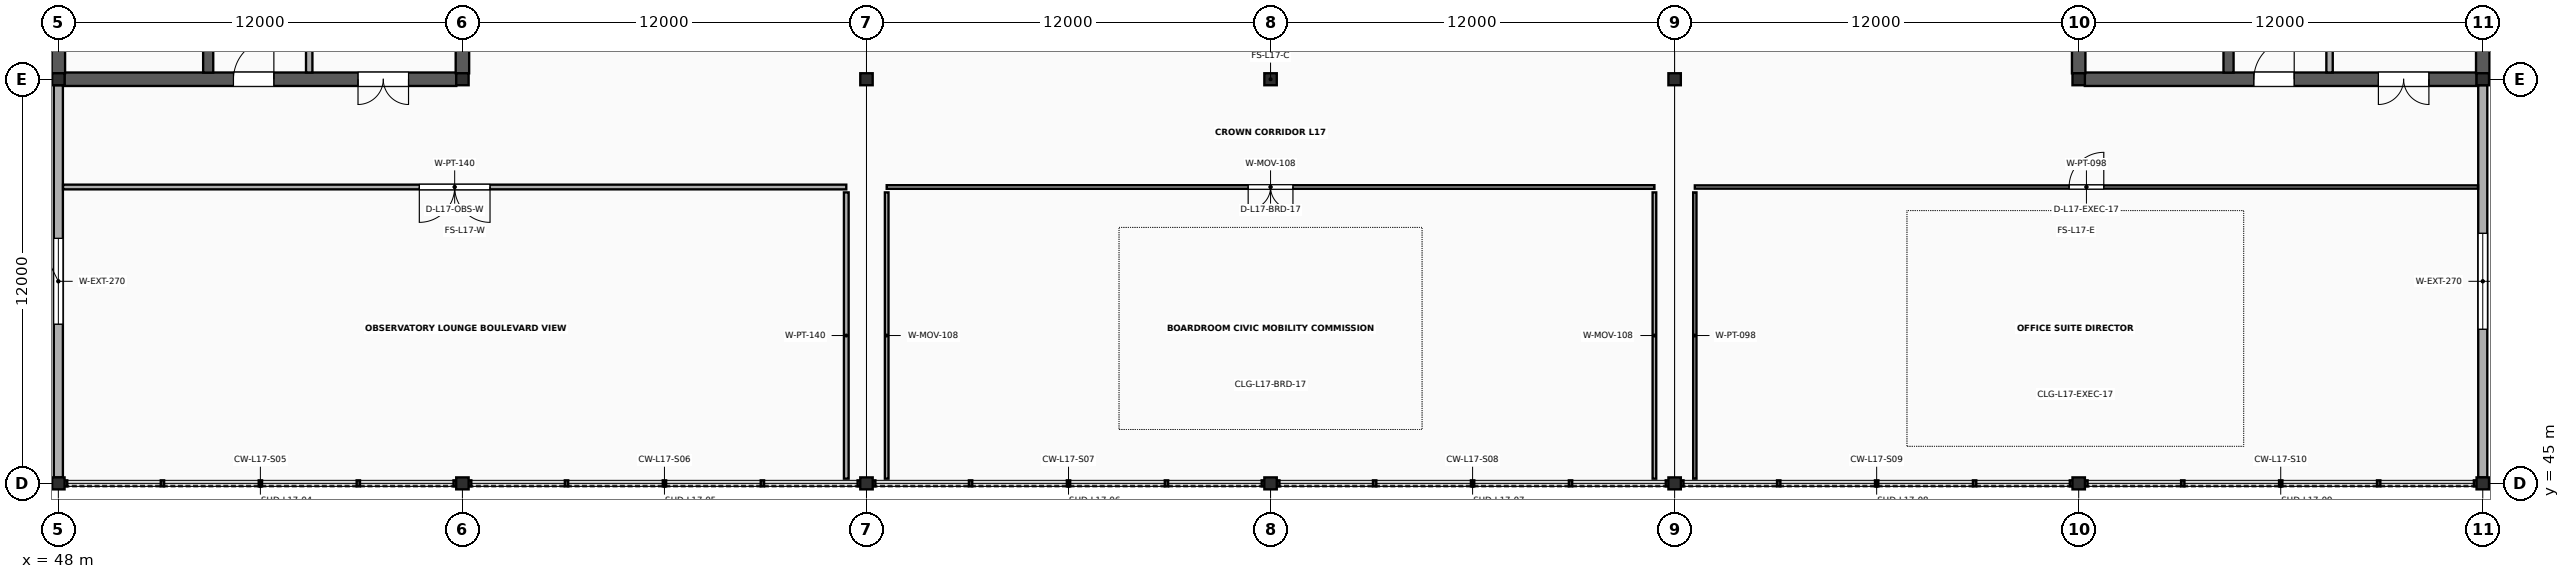
"""IFC4 building model, lengths in metres.
Left out: names, types, materials, properties, quantities, classifications, styles, units other than length and angle.
Written with IfcOpenShell. Run it as: python <this file> out.ifc"""

import sys

from ifc_helpers import new_model, si_unit, direction, frame, frame_2d, origin, origin_2d, place, context, subcontext, project, spatial, rectangle, i_section, extrude, element, fill, save


model = new_model("IFC4")
c1 = context("Model", 3, precision=1e-05, world=origin(), true_north=direction((0.0, 1.0)))
c2 = subcontext(c1, "Body", "Model", "MODEL_VIEW")
j1 = project(units=[si_unit("LENGTHUNIT", "METRE"), si_unit("PLANEANGLEUNIT", "RADIAN")], contexts=[c1])
p1 = place(None, origin())
s1 = spatial("IfcSite", under=j1, at=p1, CompositionType="ELEMENT")
p2 = place(p1, origin())
s2 = spatial("IfcBuilding", under=s1, at=p2, CompositionType="ELEMENT")
p3 = place(p2, frame((0.0, 0.0, 69.6)))
s3 = spatial("IfcBuildingStorey", under=s2, at=p3, CompositionType="ELEMENT", Elevation=69.6)
for number, where, z_axis, x_axis in (
    (1, (48.0, 45.0, 0.0), (0.0, 0.0, 1.0), (1.0, 0.0, 0.0)),
    (2, (48.0, 57.0, 0.0), (0.0, 0.0, 1.0), (1.0, 0.0, 0.0)),
    (3, (60.0, 45.0, 0.0), (0.0, 0.0, 1.0), (1.0, 0.0, 0.0)),
    (4, (60.0, 57.0, 0.0), (0.0, 0.0, 1.0), (1.0, 0.0, 0.0)),
    (5, (72.0, 45.0, 0.0), (0.0, 0.0, 1.0), (1.0, 0.0, 0.0)),
    (6, (72.0, 57.0, 0.0), (0.0, 0.0, 1.0), (1.0, 0.0, 0.0)),
    (7, (84.0, 45.0, 0.0), (0.0, 0.0, 1.0), (1.0, 0.0, 0.0)),
    (8, (84.0, 57.0, 0.0), (0.0, 0.0, 1.0), (1.0, 0.0, 0.0)),
    (9, (96.0, 45.0, 0.0), (0.0, 0.0, 1.0), (1.0, 0.0, 0.0)),
    (10, (96.0, 57.0, 0.0), (0.0, 0.0, 1.0), (1.0, 0.0, 0.0)),
    (11, (108.0, 45.0, 0.0), (0.0, 0.0, 1.0), (1.0, 0.0, 0.0)),
    (12, (108.0, 57.0, 0.0), (0.0, 0.0, 1.0), (1.0, 0.0, 0.0)),
    (13, (120.0, 45.0, 0.0), (0.0, 0.0, 1.0), (1.0, 0.0, 0.0)),
    (14, (120.0, 57.0, 0.0), (0.0, 0.0, 1.0), (1.0, 0.0, 0.0)),
):
    element("IfcColumn", number, at=place(p3, frame(where, z_axis=z_axis, x_axis=x_axis)), inside=s3, PredefinedType="COLUMN", context=c2, shape_type="SweptSolid", body=[
        extrude(i_section(OverallWidth=0.369, OverallDepth=0.356, WebThickness=0.011, FlangeThickness=0.018, FilletRadius=0.018, at=origin_2d()), origin(), (0.0, 0.0, 1.0), 4.6),
    ])
p4 = place(p3, frame((48.181, 57.0, 0.0), z_axis=(0.0, 0.0, 1.0), x_axis=(1.0, 0.0, 0.0)))
e15 = element("IfcWall", 15, at=p4, inside=s3, PredefinedType="SHEAR", context=c2, shape_type="SweptSolid", body=[
    extrude(rectangle(XDim=11.637, YDim=0.4, at=frame_2d((5.819, 0.0))), origin(), (0.0, 0.0, 1.0), 4.383),
])
p5 = place(p4, frame((5.019, 0.0, 0.0)))
e16 = element("IfcOpeningElement", 16, at=p5, cuts=e15, PredefinedType="OPENING", context=c2, shape_type="SweptSolid", body=[
    extrude(rectangle(XDim=1.2, YDim=2.2, at=frame_2d((0.6, 1.1))), frame((0.0, 0.215, 0.0), z_axis=(0.0, -1.0, 0.0), x_axis=(1.0, 0.0, 0.0)), (0.0, 0.0, 1.0), 0.43),
])
p6 = place(p4, frame((8.718, 0.0, 0.0)))
e17 = element("IfcOpeningElement", 17, at=p6, cuts=e15, PredefinedType="OPENING", context=c2, shape_type="SweptSolid", body=[
    extrude(rectangle(XDim=1.5, YDim=2.25, at=frame_2d((0.75, 1.125))), frame((0.0, 0.215, 0.0), z_axis=(0.0, -1.0, 0.0), x_axis=(1.0, 0.0, 0.0)), (0.0, 0.0, 1.0), 0.43),
])
for number, where, z_axis, x_axis in (
    (18, (48.0, 57.175, 0.0), (0.0, 0.0, 1.0), (0.0, 1.0, 0.0)),
    (19, (60.0, 57.175, 0.0), (0.0, 0.0, 1.0), (0.0, 1.0, 0.0)),
):
    element("IfcWall", number, at=place(p3, frame(where, z_axis=z_axis, x_axis=x_axis)), inside=s3, PredefinedType="SHEAR", context=c2, shape_type="SweptSolid", body=[
        extrude(rectangle(XDim=11.65, YDim=0.4, at=frame_2d((5.825, 0.0))), origin(), (0.0, 0.0, 1.0), 4.383),
    ])
p7 = place(p3, frame((52.45, 57.197, 0.0), z_axis=(0.0, 0.0, 1.0), x_axis=(0.0, 1.0, 0.0)))
e20 = element("IfcWall", 20, at=p7, inside=s3, PredefinedType="SHEAR", context=c2, shape_type="SweptSolid", body=[
    extrude(rectangle(XDim=11.606, YDim=0.3, at=frame_2d((5.803, 0.0))), origin(), (0.0, 0.0, 1.0), 4.383),
])
p8 = place(p7, frame((0.9, 0.0, 0.0)))
e21 = element("IfcOpeningElement", 21, at=p8, cuts=e20, PredefinedType="OPENING", context=c2, shape_type="SweptSolid", body=[
    extrude(rectangle(XDim=1.1, YDim=2.2, at=frame_2d((0.55, 1.1))), frame((0.0, 0.165, 0.0), z_axis=(0.0, -1.0, 0.0), x_axis=(1.0, 0.0, 0.0)), (0.0, 0.0, 1.0), 0.33),
])
p9 = place(p3, frame((55.45, 57.2, 0.0), z_axis=(0.0, 0.0, 1.0), x_axis=(0.0, 1.0, 0.0)))
e22 = element("IfcWall", 22, at=p9, inside=s3, PredefinedType="SOLIDWALL", context=c2, shape_type="SweptSolid", body=[
    extrude(rectangle(XDim=8.48, YDim=0.19, at=frame_2d((4.24, 0.0))), origin(), (0.0, 0.0, 1.0), 4.373),
])
p10 = place(p9, frame((3.6, 0.0, 0.0)))
e23 = element("IfcOpeningElement", 23, at=p10, cuts=e22, PredefinedType="OPENING", context=c2, shape_type="SweptSolid", body=[
    extrude(rectangle(XDim=1.04, YDim=2.18, at=frame_2d((0.52, 1.09))), frame((0.0, 0.11, 0.0), z_axis=(0.0, -1.0, 0.0), x_axis=(1.0, 0.0, 0.0)), (0.0, 0.0, 1.0), 0.22),
])
p11 = place(p3, frame((108.181, 57.0, 0.0), z_axis=(0.0, 0.0, 1.0), x_axis=(1.0, 0.0, 0.0)))
e24 = element("IfcWall", 24, at=p11, inside=s3, PredefinedType="SHEAR", context=c2, shape_type="SweptSolid", body=[
    extrude(rectangle(XDim=11.637, YDim=0.4, at=frame_2d((5.819, 0.0))), origin(), (0.0, 0.0, 1.0), 4.383),
])
p12 = place(p11, frame((5.019, 0.0, 0.0)))
e25 = element("IfcOpeningElement", 25, at=p12, cuts=e24, PredefinedType="OPENING", context=c2, shape_type="SweptSolid", body=[
    extrude(rectangle(XDim=1.2, YDim=2.2, at=frame_2d((0.6, 1.1))), frame((0.0, 0.215, 0.0), z_axis=(0.0, -1.0, 0.0), x_axis=(1.0, 0.0, 0.0)), (0.0, 0.0, 1.0), 0.43),
])
p13 = place(p11, frame((8.719, 0.0, 0.0)))
e26 = element("IfcOpeningElement", 26, at=p13, cuts=e24, PredefinedType="OPENING", context=c2, shape_type="SweptSolid", body=[
    extrude(rectangle(XDim=1.5, YDim=2.25, at=frame_2d((0.75, 1.125))), frame((0.0, 0.215, 0.0), z_axis=(0.0, -1.0, 0.0), x_axis=(1.0, 0.0, 0.0)), (0.0, 0.0, 1.0), 0.43),
])
for number, where, z_axis, x_axis in (
    (27, (108.0, 57.175, 0.0), (0.0, 0.0, 1.0), (0.0, 1.0, 0.0)),
    (28, (120.0, 57.175, 0.0), (0.0, 0.0, 1.0), (0.0, 1.0, 0.0)),
):
    element("IfcWall", number, at=place(p3, frame(where, z_axis=z_axis, x_axis=x_axis)), inside=s3, PredefinedType="SHEAR", context=c2, shape_type="SweptSolid", body=[
        extrude(rectangle(XDim=11.65, YDim=0.4, at=frame_2d((5.825, 0.0))), origin(), (0.0, 0.0, 1.0), 4.383),
    ])
p14 = place(p3, frame((112.45, 57.197, 0.0), z_axis=(0.0, 0.0, 1.0), x_axis=(0.0, 1.0, 0.0)))
e29 = element("IfcWall", 29, at=p14, inside=s3, PredefinedType="SHEAR", context=c2, shape_type="SweptSolid", body=[
    extrude(rectangle(XDim=11.606, YDim=0.3, at=frame_2d((5.803, 0.0))), origin(), (0.0, 0.0, 1.0), 4.383),
])
p15 = place(p14, frame((0.9, 0.0, 0.0)))
e30 = element("IfcOpeningElement", 30, at=p15, cuts=e29, PredefinedType="OPENING", context=c2, shape_type="SweptSolid", body=[
    extrude(rectangle(XDim=1.1, YDim=2.2, at=frame_2d((0.55, 1.1))), frame((0.0, 0.165, 0.0), z_axis=(0.0, -1.0, 0.0), x_axis=(1.0, 0.0, 0.0)), (0.0, 0.0, 1.0), 0.33),
])
p16 = place(p3, frame((115.45, 57.2, 0.0), z_axis=(0.0, 0.0, 1.0), x_axis=(0.0, 1.0, 0.0)))
e31 = element("IfcWall", 31, at=p16, inside=s3, PredefinedType="SOLIDWALL", context=c2, shape_type="SweptSolid", body=[
    extrude(rectangle(XDim=8.48, YDim=0.19, at=frame_2d((4.24, 0.0))), origin(), (0.0, 0.0, 1.0), 4.373),
])
p17 = place(p16, frame((3.6, 0.0, 0.0)))
e32 = element("IfcOpeningElement", 32, at=p17, cuts=e31, PredefinedType="OPENING", context=c2, shape_type="SweptSolid", body=[
    extrude(rectangle(XDim=1.04, YDim=2.18, at=frame_2d((0.52, 1.09))), frame((0.0, 0.11, 0.0), z_axis=(0.0, -1.0, 0.0), x_axis=(1.0, 0.0, 0.0)), (0.0, 0.0, 1.0), 0.22),
])
p18 = place(p3, frame((48.0, 45.176, 0.0), z_axis=(0.0, 0.0, 1.0), x_axis=(0.0, 1.0, 0.0)))
e33 = element("IfcWall", 33, at=p18, inside=s3, PredefinedType="SOLIDWALL", context=c2, shape_type="SweptSolid", body=[
    extrude(rectangle(XDim=11.648, YDim=0.27, at=frame_2d((5.824, 0.0))), origin(), (0.0, 0.0, 1.0), 3.836),
])
p19 = place(p18, frame((4.549, 0.0, 1.4)))
e34 = element("IfcOpeningElement", 34, at=p19, cuts=e33, PredefinedType="OPENING", context=c2, shape_type="SweptSolid", body=[
    extrude(rectangle(XDim=2.55, YDim=0.88, at=frame_2d((1.275, 0.44))), frame((0.0, 0.15, 0.0), z_axis=(0.0, -1.0, 0.0), x_axis=(1.0, 0.0, 0.0)), (0.0, 0.0, 1.0), 0.3),
])
p20 = place(p3, frame((120.0, 45.176, 0.0), z_axis=(0.0, 0.0, 1.0), x_axis=(0.0, 1.0, 0.0)))
e35 = element("IfcWall", 35, at=p20, inside=s3, PredefinedType="SOLIDWALL", context=c2, shape_type="SweptSolid", body=[
    extrude(rectangle(XDim=11.648, YDim=0.27, at=frame_2d((5.824, 0.0))), origin(), (0.0, 0.0, 1.0), 3.836),
])
p21 = place(p20, frame((4.399, 0.0, 1.4)))
e36 = element("IfcOpeningElement", 36, at=p21, cuts=e35, PredefinedType="OPENING", context=c2, shape_type="SweptSolid", body=[
    extrude(rectangle(XDim=2.85, YDim=0.88, at=frame_2d((1.425, 0.44))), frame((0.0, 0.15, 0.0), z_axis=(0.0, -1.0, 0.0), x_axis=(1.0, 0.0, 0.0)), (0.0, 0.0, 1.0), 0.3),
])
p22 = place(p3, frame((48.14, 53.8, 0.0), z_axis=(0.0, 0.0, 1.0), x_axis=(1.0, 0.0, 0.0)))
e37 = element("IfcWall", 37, at=p22, inside=s3, PredefinedType="PARTITIONING", context=c2, shape_type="SweptSolid", body=[
    extrude(rectangle(XDim=23.26, YDim=0.14, at=frame_2d((11.63, 0.0))), origin(), (0.0, 0.0, 1.0), 2.88),
])
p23 = place(p22, frame((10.58, 0.0, 0.0)))
e38 = element("IfcOpeningElement", 38, at=p23, cuts=e37, PredefinedType="OPENING", context=c2, shape_type="SweptSolid", body=[
    extrude(rectangle(XDim=2.1, YDim=2.47, at=frame_2d((1.05, 1.235))), frame((0.0, 0.085, 0.0), z_axis=(0.0, -1.0, 0.0), x_axis=(1.0, 0.0, 0.0)), (0.0, 0.0, 1.0), 0.17),
])
p24 = place(p3, frame((71.4, 45.14, 0.0), z_axis=(0.0, 0.0, 1.0), x_axis=(0.0, 1.0, 0.0)))
e39 = element("IfcWall", 39, at=p24, inside=s3, PredefinedType="PARTITIONING", context=c2, shape_type="SweptSolid", body=[
    extrude(rectangle(XDim=8.5, YDim=0.14, at=frame_2d((4.25, 0.0))), origin(), (0.0, 0.0, 1.0), 2.88),
])
p25 = place(p3, frame((72.6, 53.8, 0.0), z_axis=(0.0, 0.0, 1.0), x_axis=(1.0, 0.0, 0.0)))
e40 = element("IfcWall", 40, at=p25, inside=s3, PredefinedType="MOVABLE", context=c2, shape_type="SweptSolid", body=[
    extrude(rectangle(XDim=22.8, YDim=0.108, at=frame_2d((11.4, 0.0))), origin(), (0.0, 0.0, 1.0), 2.88),
])
p26 = place(p25, frame((10.735, 0.0, 0.0)))
e41 = element("IfcOpeningElement", 41, at=p26, cuts=e40, PredefinedType="OPENING", context=c2, shape_type="SweptSolid", body=[
    extrude(rectangle(XDim=1.33, YDim=2.2, at=frame_2d((0.665, 1.1))), frame((0.0, 0.069, 0.0), z_axis=(0.0, -1.0, 0.0), x_axis=(1.0, 0.0, 0.0)), (0.0, 0.0, 1.0), 0.138),
])
for number, where, z_axis, x_axis in (
    (42, (72.6, 45.14, 0.0), (0.0, 0.0, 1.0), (0.0, 1.0, 0.0)),
    (43, (95.4, 45.14, 0.0), (0.0, 0.0, 1.0), (0.0, 1.0, 0.0)),
):
    element("IfcWall", number, at=place(p3, frame(where, z_axis=z_axis, x_axis=x_axis)), inside=s3, PredefinedType="MOVABLE", context=c2, shape_type="SweptSolid", body=[
        extrude(rectangle(XDim=8.5, YDim=0.108, at=frame_2d((4.25, 0.0))), origin(), (0.0, 0.0, 1.0), 2.88),
    ])
p27 = place(p3, frame((96.6, 53.8, 0.0), z_axis=(0.0, 0.0, 1.0), x_axis=(1.0, 0.0, 0.0)))
e44 = element("IfcWall", 44, at=p27, inside=s3, PredefinedType="PARTITIONING", context=c2, shape_type="SweptSolid", body=[
    extrude(rectangle(XDim=23.26, YDim=0.098, at=frame_2d((11.63, 0.0))), origin(), (0.0, 0.0, 1.0), 2.88),
])
p28 = place(p27, frame((11.115, 0.0, 0.0)))
e45 = element("IfcOpeningElement", 45, at=p28, cuts=e44, PredefinedType="OPENING", context=c2, shape_type="SweptSolid", body=[
    extrude(rectangle(XDim=1.03, YDim=2.17, at=frame_2d((0.515, 1.085))), frame((0.0, 0.064, 0.0), z_axis=(0.0, -1.0, 0.0), x_axis=(1.0, 0.0, 0.0)), (0.0, 0.0, 1.0), 0.128),
])
p29 = place(p3, frame((96.6, 45.14, 0.0), z_axis=(0.0, 0.0, 1.0), x_axis=(0.0, 1.0, 0.0)))
e46 = element("IfcWall", 46, at=p29, inside=s3, PredefinedType="PARTITIONING", context=c2, shape_type="SweptSolid", body=[
    extrude(rectangle(XDim=8.5, YDim=0.098, at=frame_2d((4.25, 0.0))), origin(), (0.0, 0.0, 1.0), 2.88),
])
p30 = place(p19, origin())
e47 = element("IfcWindow", 47, at=p30, inside=s3, PartitioningType="DOUBLE_PANEL_VERTICAL", PredefinedType="USERDEFINED", context=c2, shape_type="SweptSolid", body=[
    extrude(rectangle(XDim=2.55, YDim=0.88, at=frame_2d((1.275, 0.44))), frame((0.0, 0.03, 0.0), z_axis=(0.0, -1.0, 0.0), x_axis=(1.0, 0.0, 0.0)), (0.0, 0.0, 1.0), 0.06),
])
fill(e34, e47)
p31 = place(p21, origin())
e48 = element("IfcWindow", 48, at=p31, inside=s3, PartitioningType="DOUBLE_PANEL_VERTICAL", PredefinedType="USERDEFINED", context=c2, shape_type="SweptSolid", body=[
    extrude(rectangle(XDim=2.85, YDim=0.88, at=frame_2d((1.425, 0.44))), frame((0.0, 0.03, 0.0), z_axis=(0.0, -1.0, 0.0), x_axis=(1.0, 0.0, 0.0)), (0.0, 0.0, 1.0), 0.06),
])
fill(e36, e48)
p32 = place(p5, origin())
e49 = element("IfcDoor", 49, at=p32, inside=s3, OperationType="SINGLE_SWING_RIGHT", PredefinedType="DOOR", context=c2, shape_type="SweptSolid", body=[
    extrude(rectangle(XDim=1.2, YDim=2.2, at=frame_2d((0.6, 1.1))), frame((0.0, 0.025, 0.0), z_axis=(0.0, -1.0, 0.0), x_axis=(1.0, 0.0, 0.0)), (0.0, 0.0, 1.0), 0.05),
])
fill(e16, e49)
p33 = place(p6, origin())
e50 = element("IfcDoor", 50, at=p33, inside=s3, OperationType="DOUBLE_DOOR_SINGLE_SWING", PredefinedType="DOOR", context=c2, shape_type="SweptSolid", body=[
    extrude(rectangle(XDim=1.5, YDim=2.25, at=frame_2d((0.75, 1.125))), frame((0.0, 0.025, 0.0), z_axis=(0.0, -1.0, 0.0), x_axis=(1.0, 0.0, 0.0)), (0.0, 0.0, 1.0), 0.05),
])
fill(e17, e50)
p34 = place(p12, origin())
e51 = element("IfcDoor", 51, at=p34, inside=s3, OperationType="SINGLE_SWING_RIGHT", PredefinedType="DOOR", context=c2, shape_type="SweptSolid", body=[
    extrude(rectangle(XDim=1.2, YDim=2.2, at=frame_2d((0.6, 1.1))), frame((0.0, 0.025, 0.0), z_axis=(0.0, -1.0, 0.0), x_axis=(1.0, 0.0, 0.0)), (0.0, 0.0, 1.0), 0.05),
])
fill(e25, e51)
p35 = place(p13, origin())
e52 = element("IfcDoor", 52, at=p35, inside=s3, OperationType="DOUBLE_DOOR_SINGLE_SWING", PredefinedType="DOOR", context=c2, shape_type="SweptSolid", body=[
    extrude(rectangle(XDim=1.5, YDim=2.25, at=frame_2d((0.75, 1.125))), frame((0.0, 0.025, 0.0), z_axis=(0.0, -1.0, 0.0), x_axis=(1.0, 0.0, 0.0)), (0.0, 0.0, 1.0), 0.05),
])
fill(e26, e52)
p36 = place(p23, origin())
e53 = element("IfcDoor", 53, at=p36, inside=s3, OperationType="DOUBLE_DOOR_SINGLE_SWING", PredefinedType="DOOR", context=c2, shape_type="SweptSolid", body=[
    extrude(rectangle(XDim=2.1, YDim=2.47, at=frame_2d((1.05, 1.235))), frame((0.0, 0.025, 0.0), z_axis=(0.0, -1.0, 0.0), x_axis=(1.0, 0.0, 0.0)), (0.0, 0.0, 1.0), 0.05),
])
fill(e38, e53)
p37 = place(p26, origin())
e54 = element("IfcDoor", 54, at=p37, inside=s3, OperationType="DOUBLE_DOOR_SINGLE_SWING", PredefinedType="DOOR", context=c2, shape_type="SweptSolid", body=[
    extrude(rectangle(XDim=1.33, YDim=2.2, at=frame_2d((0.665, 1.1))), frame((0.0, 0.025, 0.0), z_axis=(0.0, -1.0, 0.0), x_axis=(1.0, 0.0, 0.0)), (0.0, 0.0, 1.0), 0.05),
])
fill(e41, e54)
p38 = place(p28, origin())
e55 = element("IfcDoor", 55, at=p38, inside=s3, OperationType="SINGLE_SWING_RIGHT", PredefinedType="DOOR", context=c2, shape_type="SweptSolid", body=[
    extrude(rectangle(XDim=1.03, YDim=2.17, at=frame_2d((0.515, 1.085))), frame((0.0, 0.025, 0.0), z_axis=(0.0, -1.0, 0.0), x_axis=(1.0, 0.0, 0.0)), (0.0, 0.0, 1.0), 0.05),
])
fill(e45, e55)
save(model, sys.argv[1])
